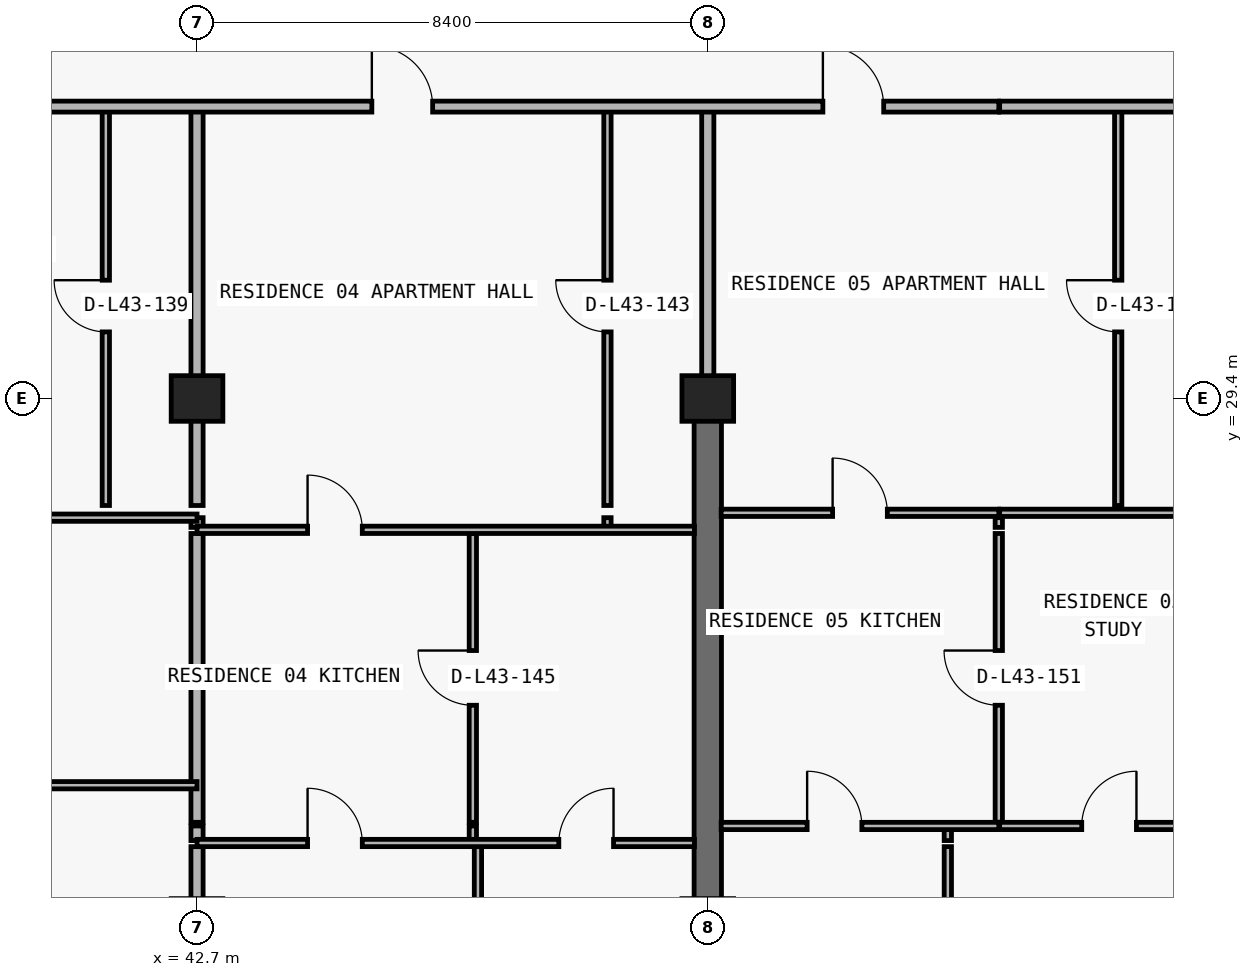
"""IFC4 building model, lengths in metres.
Left out: names, types, materials, properties, quantities, classifications, styles, units other than length and angle.
Written with IfcOpenShell. Run it as: python <this file> out.ifc"""

import sys

from ifc_helpers import new_model, si_unit, direction, frame, frame_2d, origin, origin_2d, place, context, subcontext, project, spatial, rectangle, extrude, element, fill, save


model = new_model("IFC4")
c1 = context("Model", 3, precision=1e-05, world=origin(), true_north=direction((0.0, 1.0)))
c2 = subcontext(c1, "Body", "Model", "MODEL_VIEW")
j1 = project(units=[si_unit("LENGTHUNIT", "METRE"), si_unit("PLANEANGLEUNIT", "RADIAN")], contexts=[c1])
p1 = place(None, origin())
s1 = spatial("IfcSite", under=j1, at=p1, CompositionType="ELEMENT")
p2 = place(p1, origin())
s2 = spatial("IfcBuilding", under=s1, at=p2, CompositionType="ELEMENT")
p3 = place(p2, frame((0.0, 0.0, 157.2)))
s3 = spatial("IfcBuildingStorey", under=s2, at=p3, CompositionType="ELEMENT", Elevation=157.2)
for number, where, z_axis, x_axis in (
    (1, (42.7, 29.4, 0.0), (0.0, 0.0, 1.0), (1.0, 0.0, 0.0)),
    (2, (51.1, 29.4, 0.0), (0.0, 0.0, 1.0), (1.0, 0.0, 0.0)),
):
    element("IfcColumn", number, at=place(p3, frame(where, z_axis=z_axis, x_axis=x_axis)), inside=s3, PredefinedType="COLUMN", context=c2, shape_type="SweptSolid", body=[
        extrude(rectangle(XDim=0.85, YDim=0.75, at=origin_2d()), origin(), (0.0, 0.0, 1.0), 3.05),
    ])
p4 = place(p3, frame((51.1, 20.8, 0.0), z_axis=(0.0, 0.0, 1.0), x_axis=(0.0, 1.0, 0.0)))
e3 = element("IfcWall", 3, at=p4, inside=s3, PredefinedType="SHEAR", context=c2, shape_type="SweptSolid", body=[
    extrude(rectangle(XDim=8.6, YDim=0.45, at=frame_2d((4.3, 0.0))), origin(), (0.0, 0.0, 1.0), 3.05),
])
p5 = place(p3, frame((41.2, 27.64, 0.0), z_axis=(0.0, 0.0, 1.0), x_axis=(0.0, 1.0, 0.0)))
e4 = element("IfcWall", 4, at=p5, inside=s3, PredefinedType="PARTITIONING", context=c2, shape_type="SweptSolid", body=[
    extrude(rectangle(XDim=6.56, YDim=0.12, at=frame_2d((3.28, 0.0))), origin(), (0.0, 0.0, 1.0), 3.05),
])
p6 = place(p5, frame((2.855, 0.0, 0.0)))
e5 = element("IfcOpeningElement", 5, at=p6, cuts=e4, PredefinedType="OPENING", context=c2, shape_type="SweptSolid", body=[
    extrude(rectangle(XDim=0.85, YDim=2.1, at=frame_2d((0.425, 1.05))), frame((0.0, 0.07, 0.0), z_axis=(0.0, -1.0, 0.0), x_axis=(1.0, 0.0, 0.0)), (0.0, 0.0, 1.0), 0.14),
])
p7 = place(p3, frame((42.7, 11.24, 0.0), z_axis=(0.0, 0.0, 1.0), x_axis=(0.0, 1.0, 0.0)))
e6 = element("IfcWall", 6, at=p7, inside=s3, PredefinedType="PARTITIONING", context=c2, shape_type="SweptSolid", body=[
    extrude(rectangle(XDim=10.79, YDim=0.2, at=frame_2d((5.395, 0.0))), origin(), (0.0, 0.0, 1.0), 2.263),
])
p8 = place(p3, frame((42.7, 22.13, 0.0), z_axis=(0.0, 0.0, 1.0), x_axis=(0.0, 1.0, 0.0)))
e7 = element("IfcWall", 7, at=p8, inside=s3, PredefinedType="PARTITIONING", context=c2, shape_type="SweptSolid", body=[
    extrude(rectangle(XDim=0.24, YDim=0.2, at=frame_2d((0.12, 0.0))), origin(), (0.0, 0.0, 1.0), 2.263),
])
p9 = place(p3, frame((42.7, 22.43, 0.0), z_axis=(0.0, 0.0, 1.0), x_axis=(0.0, 1.0, 0.0)))
e8 = element("IfcWall", 8, at=p9, inside=s3, PredefinedType="PARTITIONING", context=c2, shape_type="SweptSolid", body=[
    extrude(rectangle(XDim=4.75, YDim=0.2, at=frame_2d((2.375, 0.0))), origin(), (0.0, 0.0, 1.0), 2.263),
])
p10 = place(p3, frame((42.7, 27.28, 0.0), z_axis=(0.0, 0.0, 1.0), x_axis=(0.0, 1.0, 0.0)))
e9 = element("IfcWall", 9, at=p10, inside=s3, PredefinedType="PARTITIONING", context=c2, shape_type="SweptSolid", body=[
    extrude(rectangle(XDim=0.16, YDim=0.2, at=frame_2d((0.08, 0.0))), origin(), (0.0, 0.0, 1.0), 2.263),
])
p11 = place(p3, frame((42.7, 27.64, 0.0), z_axis=(0.0, 0.0, 1.0), x_axis=(0.0, 1.0, 0.0)))
e10 = element("IfcWall", 10, at=p11, inside=s3, PredefinedType="PARTITIONING", context=c2, shape_type="SweptSolid", body=[
    extrude(rectangle(XDim=6.56, YDim=0.2, at=frame_2d((3.28, 0.0))), origin(), (0.0, 0.0, 1.0), 2.263),
])
p12 = place(p3, frame((47.236, 22.13, 0.0), z_axis=(0.0, 0.0, 1.0), x_axis=(0.0, 1.0, 0.0)))
e11 = element("IfcWall", 11, at=p12, inside=s3, PredefinedType="PARTITIONING", context=c2, shape_type="SweptSolid", body=[
    extrude(rectangle(XDim=0.24, YDim=0.12, at=frame_2d((0.12, 0.0))), origin(), (0.0, 0.0, 1.0), 3.05),
])
p13 = place(p3, frame((47.236, 22.43, 0.0), z_axis=(0.0, 0.0, 1.0), x_axis=(0.0, 1.0, 0.0)))
e12 = element("IfcWall", 12, at=p13, inside=s3, PredefinedType="PARTITIONING", context=c2, shape_type="SweptSolid", body=[
    extrude(rectangle(XDim=4.75, YDim=0.12, at=frame_2d((2.375, 0.0))), origin(), (0.0, 0.0, 1.0), 3.05),
])
p14 = place(p13, frame((1.925, 0.0, 0.0)))
e13 = element("IfcOpeningElement", 13, at=p14, cuts=e12, PredefinedType="OPENING", context=c2, shape_type="SweptSolid", body=[
    extrude(rectangle(XDim=0.9, YDim=2.15, at=frame_2d((0.45, 1.075))), frame((0.0, 0.07, 0.0), z_axis=(0.0, -1.0, 0.0), x_axis=(1.0, 0.0, 0.0)), (0.0, 0.0, 1.0), 0.14),
])
p15 = place(p3, frame((47.32, 11.24, 0.0), z_axis=(0.0, 0.0, 1.0), x_axis=(0.0, 1.0, 0.0)))
e14 = element("IfcWall", 14, at=p15, inside=s3, PredefinedType="PARTITIONING", context=c2, shape_type="SweptSolid", body=[
    extrude(rectangle(XDim=10.79, YDim=0.12, at=frame_2d((5.395, 0.0))), origin(), (0.0, 0.0, 1.0), 3.05),
])
p16 = place(p3, frame((49.45, 27.28, 0.0), z_axis=(0.0, 0.0, 1.0), x_axis=(0.0, 1.0, 0.0)))
e15 = element("IfcWall", 15, at=p16, inside=s3, PredefinedType="PARTITIONING", context=c2, shape_type="SweptSolid", body=[
    extrude(rectangle(XDim=0.16, YDim=0.12, at=frame_2d((0.08, 0.0))), origin(), (0.0, 0.0, 1.0), 3.05),
])
p17 = place(p3, frame((49.45, 27.64, 0.0), z_axis=(0.0, 0.0, 1.0), x_axis=(0.0, 1.0, 0.0)))
e16 = element("IfcWall", 16, at=p17, inside=s3, PredefinedType="PARTITIONING", context=c2, shape_type="SweptSolid", body=[
    extrude(rectangle(XDim=6.56, YDim=0.12, at=frame_2d((3.28, 0.0))), origin(), (0.0, 0.0, 1.0), 3.05),
])
p18 = place(p17, frame((2.855, 0.0, 0.0)))
e17 = element("IfcOpeningElement", 17, at=p18, cuts=e16, PredefinedType="OPENING", context=c2, shape_type="SweptSolid", body=[
    extrude(rectangle(XDim=0.85, YDim=2.1, at=frame_2d((0.425, 1.05))), frame((0.0, 0.07, 0.0), z_axis=(0.0, -1.0, 0.0), x_axis=(1.0, 0.0, 0.0)), (0.0, 0.0, 1.0), 0.14),
])
p19 = place(p3, frame((51.1, 29.405, 0.0), z_axis=(0.0, 0.0, 1.0), x_axis=(0.0, 1.0, 0.0)))
e18 = element("IfcWall", 18, at=p19, inside=s3, PredefinedType="PARTITIONING", context=c2, shape_type="SweptSolid", body=[
    extrude(rectangle(XDim=4.795, YDim=0.2, at=frame_2d((2.397, 0.0))), origin(), (0.0, 0.0, 1.0), 2.335),
])
p20 = place(p3, frame((55.048, 11.24, 0.0), z_axis=(0.0, 0.0, 1.0), x_axis=(0.0, 1.0, 0.0)))
e19 = element("IfcWall", 19, at=p20, inside=s3, PredefinedType="PARTITIONING", context=c2, shape_type="SweptSolid", body=[
    extrude(rectangle(XDim=10.79, YDim=0.12, at=frame_2d((5.395, 0.0))), origin(), (0.0, 0.0, 1.0), 3.05),
])
p21 = place(p3, frame((55.048, 22.13, 0.0), z_axis=(0.0, 0.0, 1.0), x_axis=(0.0, 1.0, 0.0)))
e20 = element("IfcWall", 20, at=p21, inside=s3, PredefinedType="PARTITIONING", context=c2, shape_type="SweptSolid", body=[
    extrude(rectangle(XDim=0.24, YDim=0.12, at=frame_2d((0.12, 0.0))), origin(), (0.0, 0.0, 1.0), 3.05),
])
p22 = place(p3, frame((55.886, 22.43, 0.0), z_axis=(0.0, 0.0, 1.0), x_axis=(0.0, 1.0, 0.0)))
e21 = element("IfcWall", 21, at=p22, inside=s3, PredefinedType="PARTITIONING", context=c2, shape_type="SweptSolid", body=[
    extrude(rectangle(XDim=4.75, YDim=0.12, at=frame_2d((2.375, 0.0))), origin(), (0.0, 0.0, 1.0), 3.05),
])
p23 = place(p22, frame((1.925, 0.0, 0.0)))
e22 = element("IfcOpeningElement", 22, at=p23, cuts=e21, PredefinedType="OPENING", context=c2, shape_type="SweptSolid", body=[
    extrude(rectangle(XDim=0.9, YDim=2.15, at=frame_2d((0.45, 1.075))), frame((0.0, 0.07, 0.0), z_axis=(0.0, -1.0, 0.0), x_axis=(1.0, 0.0, 0.0)), (0.0, 0.0, 1.0), 0.14),
])
p24 = place(p3, frame((55.886, 27.28, 0.0), z_axis=(0.0, 0.0, 1.0), x_axis=(0.0, 1.0, 0.0)))
e23 = element("IfcWall", 23, at=p24, inside=s3, PredefinedType="PARTITIONING", context=c2, shape_type="SweptSolid", body=[
    extrude(rectangle(XDim=0.16, YDim=0.12, at=frame_2d((0.08, 0.0))), origin(), (0.0, 0.0, 1.0), 3.05),
])
p25 = place(p3, frame((57.85, 27.64, 0.0), z_axis=(0.0, 0.0, 1.0), x_axis=(0.0, 1.0, 0.0)))
e24 = element("IfcWall", 24, at=p25, inside=s3, PredefinedType="PARTITIONING", context=c2, shape_type="SweptSolid", body=[
    extrude(rectangle(XDim=6.56, YDim=0.12, at=frame_2d((3.28, 0.0))), origin(), (0.0, 0.0, 1.0), 3.05),
])
p26 = place(p25, frame((2.855, 0.0, 0.0)))
e25 = element("IfcOpeningElement", 25, at=p26, cuts=e24, PredefinedType="OPENING", context=c2, shape_type="SweptSolid", body=[
    extrude(rectangle(XDim=0.85, YDim=2.1, at=frame_2d((0.425, 1.05))), frame((0.0, 0.07, 0.0), z_axis=(0.0, -1.0, 0.0), x_axis=(1.0, 0.0, 0.0)), (0.0, 0.0, 1.0), 0.14),
])
p27 = place(p3, frame((42.7, 22.09, 0.0), z_axis=(0.0, 0.0, 1.0), x_axis=(1.0, 0.0, 0.0)))
e26 = element("IfcWall", 26, at=p27, inside=s3, PredefinedType="PARTITIONING", context=c2, shape_type="SweptSolid", body=[
    extrude(rectangle(XDim=8.18, YDim=0.12, at=frame_2d((4.09, 0.0))), origin(), (0.0, 0.0, 1.0), 3.05),
])
p28 = place(p27, frame((1.818, 0.0, 0.0)))
e27 = element("IfcOpeningElement", 27, at=p28, cuts=e26, PredefinedType="OPENING", context=c2, shape_type="SweptSolid", body=[
    extrude(rectangle(XDim=0.9, YDim=2.15, at=frame_2d((0.45, 1.075))), frame((0.0, 0.07, 0.0), z_axis=(0.0, -1.0, 0.0), x_axis=(1.0, 0.0, 0.0)), (0.0, 0.0, 1.0), 0.14),
])
p29 = place(p27, frame((5.95, 0.0, 0.0)))
e28 = element("IfcOpeningElement", 28, at=p29, cuts=e26, PredefinedType="OPENING", context=c2, shape_type="SweptSolid", body=[
    extrude(rectangle(XDim=0.9, YDim=2.15, at=frame_2d((0.45, 1.075))), frame((0.0, 0.07, 0.0), z_axis=(0.0, -1.0, 0.0), x_axis=(1.0, 0.0, 0.0)), (0.0, 0.0, 1.0), 0.14),
])
p30 = place(p3, frame((51.32, 22.37, 0.0), z_axis=(0.0, 0.0, 1.0), x_axis=(1.0, 0.0, 0.0)))
e29 = element("IfcWall", 29, at=p30, inside=s3, PredefinedType="PARTITIONING", context=c2, shape_type="SweptSolid", body=[
    extrude(rectangle(XDim=4.566, YDim=0.12, at=frame_2d((2.283, 0.0))), origin(), (0.0, 0.0, 1.0), 3.05),
])
p31 = place(p30, frame((1.414, 0.0, 0.0)))
e30 = element("IfcOpeningElement", 30, at=p31, cuts=e29, PredefinedType="OPENING", context=c2, shape_type="SweptSolid", body=[
    extrude(rectangle(XDim=0.9, YDim=2.15, at=frame_2d((0.45, 1.075))), frame((0.0, 0.07, 0.0), z_axis=(0.0, -1.0, 0.0), x_axis=(1.0, 0.0, 0.0)), (0.0, 0.0, 1.0), 0.14),
])
p32 = place(p3, frame((55.9, 22.37, 0.0), z_axis=(0.0, 0.0, 1.0), x_axis=(1.0, 0.0, 0.0)))
e31 = element("IfcWall", 31, at=p32, inside=s3, PredefinedType="PARTITIONING", context=c2, shape_type="SweptSolid", body=[
    extrude(rectangle(XDim=3.6, YDim=0.12, at=frame_2d((1.8, 0.0))), origin(), (0.0, 0.0, 1.0), 3.05),
])
p33 = place(p32, frame((1.35, 0.0, 0.0)))
e32 = element("IfcOpeningElement", 32, at=p33, cuts=e31, PredefinedType="OPENING", context=c2, shape_type="SweptSolid", body=[
    extrude(rectangle(XDim=0.9, YDim=2.15, at=frame_2d((0.45, 1.075))), frame((0.0, 0.07, 0.0), z_axis=(0.0, -1.0, 0.0), x_axis=(1.0, 0.0, 0.0)), (0.0, 0.0, 1.0), 0.14),
])
p34 = place(p3, frame((35.105, 23.04, 0.0), z_axis=(0.0, 0.0, 1.0), x_axis=(1.0, 0.0, 0.0)))
e33 = element("IfcWall", 33, at=p34, inside=s3, PredefinedType="PARTITIONING", context=c2, shape_type="SweptSolid", body=[
    extrude(rectangle(XDim=7.595, YDim=0.12, at=frame_2d((3.797, 0.0))), origin(), (0.0, 0.0, 1.0), 3.05),
])
p35 = place(p34, frame((3.347, 0.0, 0.0)))
e34 = element("IfcOpeningElement", 34, at=p35, cuts=e33, PredefinedType="OPENING", context=c2, shape_type="SweptSolid", body=[
    extrude(rectangle(XDim=0.9, YDim=2.15, at=frame_2d((0.45, 1.075))), frame((0.0, 0.07, 0.0), z_axis=(0.0, -1.0, 0.0), x_axis=(1.0, 0.0, 0.0)), (0.0, 0.0, 1.0), 0.14),
])
p36 = place(p3, frame((42.7, 27.24, 0.0), z_axis=(0.0, 0.0, 1.0), x_axis=(1.0, 0.0, 0.0)))
e35 = element("IfcWall", 35, at=p36, inside=s3, PredefinedType="PARTITIONING", context=c2, shape_type="SweptSolid", body=[
    extrude(rectangle(XDim=8.18, YDim=0.12, at=frame_2d((4.09, 0.0))), origin(), (0.0, 0.0, 1.0), 3.05),
])
p37 = place(p36, frame((1.818, 0.0, 0.0)))
e36 = element("IfcOpeningElement", 36, at=p37, cuts=e35, PredefinedType="OPENING", context=c2, shape_type="SweptSolid", body=[
    extrude(rectangle(XDim=0.9, YDim=2.15, at=frame_2d((0.45, 1.075))), frame((0.0, 0.07, 0.0), z_axis=(0.0, -1.0, 0.0), x_axis=(1.0, 0.0, 0.0)), (0.0, 0.0, 1.0), 0.14),
])
p38 = place(p3, frame((35.1, 27.44, 0.0), z_axis=(0.0, 0.0, 1.0), x_axis=(1.0, 0.0, 0.0)))
e37 = element("IfcWall", 37, at=p38, inside=s3, PredefinedType="PARTITIONING", context=c2, shape_type="SweptSolid", body=[
    extrude(rectangle(XDim=7.6, YDim=0.12, at=frame_2d((3.8, 0.0))), origin(), (0.0, 0.0, 1.0), 3.05),
])
p39 = place(p38, frame((2.6, 0.0, 0.0)))
e38 = element("IfcOpeningElement", 38, at=p39, cuts=e37, PredefinedType="OPENING", context=c2, shape_type="SweptSolid", body=[
    extrude(rectangle(XDim=0.9, YDim=2.15, at=frame_2d((0.45, 1.075))), frame((0.0, 0.07, 0.0), z_axis=(0.0, -1.0, 0.0), x_axis=(1.0, 0.0, 0.0)), (0.0, 0.0, 1.0), 0.14),
])
p40 = place(p3, frame((51.32, 27.52, 0.0), z_axis=(0.0, 0.0, 1.0), x_axis=(1.0, 0.0, 0.0)))
e39 = element("IfcWall", 39, at=p40, inside=s3, PredefinedType="PARTITIONING", context=c2, shape_type="SweptSolid", body=[
    extrude(rectangle(XDim=4.566, YDim=0.12, at=frame_2d((2.283, 0.0))), origin(), (0.0, 0.0, 1.0), 3.05),
])
p41 = place(p40, frame((1.833, 0.0, 0.0)))
e40 = element("IfcOpeningElement", 40, at=p41, cuts=e39, PredefinedType="OPENING", context=c2, shape_type="SweptSolid", body=[
    extrude(rectangle(XDim=0.9, YDim=2.15, at=frame_2d((0.45, 1.075))), frame((0.0, 0.07, 0.0), z_axis=(0.0, -1.0, 0.0), x_axis=(1.0, 0.0, 0.0)), (0.0, 0.0, 1.0), 0.14),
])
p42 = place(p3, frame((55.9, 27.52, 0.0), z_axis=(0.0, 0.0, 1.0), x_axis=(1.0, 0.0, 0.0)))
e41 = element("IfcWall", 41, at=p42, inside=s3, PredefinedType="PARTITIONING", context=c2, shape_type="SweptSolid", body=[
    extrude(rectangle(XDim=3.6, YDim=0.12, at=frame_2d((1.8, 0.0))), origin(), (0.0, 0.0, 1.0), 3.05),
])
p43 = place(p3, frame((18.3, 34.2, 0.0), z_axis=(0.0, 0.0, 1.0), x_axis=(1.0, 0.0, 0.0)))
e42 = element("IfcWall", 42, at=p43, inside=s3, PredefinedType="PARTITIONING", context=c2, shape_type="SweptSolid", body=[
    extrude(rectangle(XDim=37.586, YDim=0.18, at=frame_2d((18.793, 0.0))), origin(), (0.0, 0.0, 1.0), 3.05),
])
p44 = place(p43, frame((2.875, 0.0, 0.0)))
e43 = element("IfcOpeningElement", 43, at=p44, cuts=e42, PredefinedType="OPENING", context=c2, shape_type="SweptSolid", body=[
    extrude(rectangle(XDim=1.0, YDim=2.2, at=frame_2d((0.5, 1.1))), frame((0.0, 0.1, 0.0), z_axis=(0.0, -1.0, 0.0), x_axis=(1.0, 0.0, 0.0)), (0.0, 0.0, 1.0), 0.2),
])
p45 = place(p43, frame((11.315, 0.0, 0.0)))
e44 = element("IfcOpeningElement", 44, at=p45, cuts=e42, PredefinedType="OPENING", context=c2, shape_type="SweptSolid", body=[
    extrude(rectangle(XDim=1.0, YDim=2.2, at=frame_2d((0.5, 1.1))), frame((0.0, 0.1, 0.0), z_axis=(0.0, -1.0, 0.0), x_axis=(1.0, 0.0, 0.0)), (0.0, 0.0, 1.0), 0.2),
])
p46 = place(p43, frame((27.275, 0.0, 0.0)))
e45 = element("IfcOpeningElement", 45, at=p46, cuts=e42, PredefinedType="OPENING", context=c2, shape_type="SweptSolid", body=[
    extrude(rectangle(XDim=1.0, YDim=2.2, at=frame_2d((0.5, 1.1))), frame((0.0, 0.1, 0.0), z_axis=(0.0, -1.0, 0.0), x_axis=(1.0, 0.0, 0.0)), (0.0, 0.0, 1.0), 0.2),
])
p47 = place(p43, frame((34.693, 0.0, 0.0)))
e46 = element("IfcOpeningElement", 46, at=p47, cuts=e42, PredefinedType="OPENING", context=c2, shape_type="SweptSolid", body=[
    extrude(rectangle(XDim=1.0, YDim=2.2, at=frame_2d((0.5, 1.1))), frame((0.0, 0.1, 0.0), z_axis=(0.0, -1.0, 0.0), x_axis=(1.0, 0.0, 0.0)), (0.0, 0.0, 1.0), 0.2),
])
p48 = place(p3, frame((55.9, 34.2, 0.0), z_axis=(0.0, 0.0, 1.0), x_axis=(1.0, 0.0, 0.0)))
e47 = element("IfcWall", 47, at=p48, inside=s3, PredefinedType="PARTITIONING", context=c2, shape_type="SweptSolid", body=[
    extrude(rectangle(XDim=3.6, YDim=0.18, at=frame_2d((1.8, 0.0))), origin(), (0.0, 0.0, 1.0), 3.05),
])
p49 = place(p6, origin())
e48 = element("IfcDoor", 48, at=p49, inside=s3, OperationType="SINGLE_SWING_RIGHT", PredefinedType="DOOR", context=c2, shape_type="SweptSolid", body=[
    extrude(rectangle(XDim=0.85, YDim=2.1, at=frame_2d((0.425, 1.05))), frame((0.0, 0.025, 0.0), z_axis=(0.0, -1.0, 0.0), x_axis=(1.0, 0.0, 0.0)), (0.0, 0.0, 1.0), 0.05),
])
fill(e5, e48)
p50 = place(p46, origin())
e49 = element("IfcDoor", 49, at=p50, inside=s3, OperationType="SINGLE_SWING_LEFT", PredefinedType="DOOR", context=c2, shape_type="SweptSolid", body=[
    extrude(rectangle(XDim=1.0, YDim=2.2, at=frame_2d((0.5, 1.1))), frame((0.0, 0.025, 0.0), z_axis=(0.0, -1.0, 0.0), x_axis=(1.0, 0.0, 0.0)), (0.0, 0.0, 1.0), 0.05),
])
fill(e45, e49)
p51 = place(p18, origin())
e50 = element("IfcDoor", 50, at=p51, inside=s3, OperationType="SINGLE_SWING_RIGHT", PredefinedType="DOOR", context=c2, shape_type="SweptSolid", body=[
    extrude(rectangle(XDim=0.85, YDim=2.1, at=frame_2d((0.425, 1.05))), frame((0.0, 0.025, 0.0), z_axis=(0.0, -1.0, 0.0), x_axis=(1.0, 0.0, 0.0)), (0.0, 0.0, 1.0), 0.05),
])
fill(e17, e50)
p52 = place(p37, origin())
e51 = element("IfcDoor", 51, at=p52, inside=s3, OperationType="SINGLE_SWING_LEFT", PredefinedType="DOOR", context=c2, shape_type="SweptSolid", body=[
    extrude(rectangle(XDim=0.9, YDim=2.15, at=frame_2d((0.45, 1.075))), frame((0.0, 0.025, 0.0), z_axis=(0.0, -1.0, 0.0), x_axis=(1.0, 0.0, 0.0)), (0.0, 0.0, 1.0), 0.05),
])
fill(e36, e51)
p53 = place(p14, origin())
e52 = element("IfcDoor", 52, at=p53, inside=s3, OperationType="SINGLE_SWING_RIGHT", PredefinedType="DOOR", context=c2, shape_type="SweptSolid", body=[
    extrude(rectangle(XDim=0.9, YDim=2.15, at=frame_2d((0.45, 1.075))), frame((0.0, 0.025, 0.0), z_axis=(0.0, -1.0, 0.0), x_axis=(1.0, 0.0, 0.0)), (0.0, 0.0, 1.0), 0.05),
])
fill(e13, e52)
p54 = place(p28, origin())
e53 = element("IfcDoor", 53, at=p54, inside=s3, OperationType="SINGLE_SWING_LEFT", PredefinedType="DOOR", context=c2, shape_type="SweptSolid", body=[
    extrude(rectangle(XDim=0.9, YDim=2.15, at=frame_2d((0.45, 1.075))), frame((0.0, 0.025, 0.0), z_axis=(0.0, -1.0, 0.0), x_axis=(1.0, 0.0, 0.0)), (0.0, 0.0, 1.0), 0.05),
])
fill(e27, e53)
p55 = place(p29, origin())
e54 = element("IfcDoor", 54, at=p55, inside=s3, OperationType="SINGLE_SWING_RIGHT", PredefinedType="DOOR", context=c2, shape_type="SweptSolid", body=[
    extrude(rectangle(XDim=0.9, YDim=2.15, at=frame_2d((0.45, 1.075))), frame((0.0, 0.025, 0.0), z_axis=(0.0, -1.0, 0.0), x_axis=(1.0, 0.0, 0.0)), (0.0, 0.0, 1.0), 0.05),
])
fill(e28, e54)
p56 = place(p47, origin())
e55 = element("IfcDoor", 55, at=p56, inside=s3, OperationType="SINGLE_SWING_LEFT", PredefinedType="DOOR", context=c2, shape_type="SweptSolid", body=[
    extrude(rectangle(XDim=1.0, YDim=2.2, at=frame_2d((0.5, 1.1))), frame((0.0, 0.025, 0.0), z_axis=(0.0, -1.0, 0.0), x_axis=(1.0, 0.0, 0.0)), (0.0, 0.0, 1.0), 0.05),
])
fill(e46, e55)
p57 = place(p26, origin())
e56 = element("IfcDoor", 56, at=p57, inside=s3, OperationType="SINGLE_SWING_RIGHT", PredefinedType="DOOR", context=c2, shape_type="SweptSolid", body=[
    extrude(rectangle(XDim=0.85, YDim=2.1, at=frame_2d((0.425, 1.05))), frame((0.0, 0.025, 0.0), z_axis=(0.0, -1.0, 0.0), x_axis=(1.0, 0.0, 0.0)), (0.0, 0.0, 1.0), 0.05),
])
fill(e25, e56)
p58 = place(p41, origin())
e57 = element("IfcDoor", 57, at=p58, inside=s3, OperationType="SINGLE_SWING_LEFT", PredefinedType="DOOR", context=c2, shape_type="SweptSolid", body=[
    extrude(rectangle(XDim=0.9, YDim=2.15, at=frame_2d((0.45, 1.075))), frame((0.0, 0.025, 0.0), z_axis=(0.0, -1.0, 0.0), x_axis=(1.0, 0.0, 0.0)), (0.0, 0.0, 1.0), 0.05),
])
fill(e40, e57)
p59 = place(p23, origin())
e58 = element("IfcDoor", 58, at=p59, inside=s3, OperationType="SINGLE_SWING_RIGHT", PredefinedType="DOOR", context=c2, shape_type="SweptSolid", body=[
    extrude(rectangle(XDim=0.9, YDim=2.15, at=frame_2d((0.45, 1.075))), frame((0.0, 0.025, 0.0), z_axis=(0.0, -1.0, 0.0), x_axis=(1.0, 0.0, 0.0)), (0.0, 0.0, 1.0), 0.05),
])
fill(e22, e58)
p60 = place(p31, origin())
e59 = element("IfcDoor", 59, at=p60, inside=s3, OperationType="SINGLE_SWING_LEFT", PredefinedType="DOOR", context=c2, shape_type="SweptSolid", body=[
    extrude(rectangle(XDim=0.9, YDim=2.15, at=frame_2d((0.45, 1.075))), frame((0.0, 0.025, 0.0), z_axis=(0.0, -1.0, 0.0), x_axis=(1.0, 0.0, 0.0)), (0.0, 0.0, 1.0), 0.05),
])
fill(e30, e59)
p61 = place(p33, origin())
e60 = element("IfcDoor", 60, at=p61, inside=s3, OperationType="SINGLE_SWING_RIGHT", PredefinedType="DOOR", context=c2, shape_type="SweptSolid", body=[
    extrude(rectangle(XDim=0.9, YDim=2.15, at=frame_2d((0.45, 1.075))), frame((0.0, 0.025, 0.0), z_axis=(0.0, -1.0, 0.0), x_axis=(1.0, 0.0, 0.0)), (0.0, 0.0, 1.0), 0.05),
])
fill(e32, e60)
save(model, sys.argv[1])
